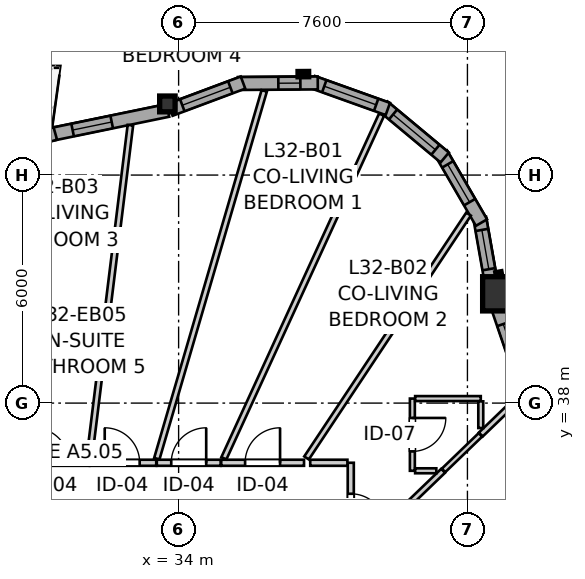
"""IFC4 building model, lengths in metres.
Left out: names, types, materials, properties, quantities, classifications, styles, units other than length and angle.
Written with IfcOpenShell. Run it as: python <this file> out.ifc"""

import sys

from ifc_helpers import new_model, si_unit, direction, frame, frame_2d, origin, origin_2d, place, context, subcontext, project, spatial, rectangle, i_section, extrude, source, transform, mapped, element, fill, save


model = new_model("IFC4")
c1 = context("Model", 3, precision=1e-05, world=origin(), true_north=direction((0.0, 1.0)))
c2 = subcontext(c1, "Body", "Model", "MODEL_VIEW")
j1 = project(units=[si_unit("LENGTHUNIT", "METRE"), si_unit("PLANEANGLEUNIT", "RADIAN")], contexts=[c1])
p1 = place(None, origin())
s1 = spatial("IfcSite", under=j1, at=p1, CompositionType="ELEMENT")
p2 = place(p1, origin())
s2 = spatial("IfcBuilding", under=s1, at=p2, CompositionType="ELEMENT")
p3 = place(p2, frame((0.0, 0.0, 108.8)))
s3 = spatial("IfcBuildingStorey", under=s2, at=p3, CompositionType="ELEMENT", Elevation=108.8)
m1 = source(origin(), c2, "Body", "SweptSolid", [
    extrude(rectangle(XDim=0.9, YDim=0.9, at=origin_2d()), origin(), (0.0, 0.0, 1.0), 2.935),
])
p4 = place(p3, frame((42.45, 40.875, 0.0), z_axis=(0.0, 0.0, 1.0), x_axis=(1.0, 0.0, 0.0)))
e1 = element("IfcColumn", 1, at=p4, inside=s3, PredefinedType="COLUMN", context=c2, shape_type="MappedRepresentation", body=[
    mapped(m1, transform((0.0, 0.0, 0.0), x_axis=(1.0, 0.0, 0.0), y_axis=(0.0, 1.0, 0.0), z_axis=(0.0, 0.0, 1.0), scale=1.0)),
])
m2 = source(origin(), c2, "Body", "SweptSolid", [
    extrude(i_section(OverallWidth=0.406, OverallDepth=0.416, WebThickness=0.027, FlangeThickness=0.044, FilletRadius=0.015, at=origin_2d()), origin(), (0.0, 0.0, 1.0), 2.935),
])
p5 = place(p3, frame((33.704, 45.872, 0.0), z_axis=(0.0, 0.0, 1.0), x_axis=(1.0, 0.0, 0.0)))
e2 = element("IfcColumn", 2, at=p5, inside=s3, PredefinedType="PILASTER", context=c2, shape_type="MappedRepresentation", body=[
    mapped(m2, transform((0.0, 0.0, 0.0), x_axis=(1.0, 0.0, 0.0), y_axis=(0.0, 1.0, 0.0), z_axis=(0.0, 0.0, 1.0), scale=1.0)),
])
p6 = place(p3, frame((43.319, 37.809, 0.0), z_axis=(0.0, 0.0, 1.0), x_axis=(-0.323586371726, 0.946198636669, 0.0)))
e3 = element("IfcWall", 3, at=p6, inside=s3, PredefinedType="SOLIDWALL", context=c2, shape_type="SweptSolid", body=[
    extrude(rectangle(XDim=2.952, YDim=0.34, at=frame_2d((1.476, 0.0))), origin(), (0.0, 0.0, 1.0), 2.465),
])
p7 = place(p6, frame((0.949, 0.0, 0.82)))
e4 = element("IfcOpeningElement", 4, at=p7, cuts=e3, PredefinedType="OPENING", context=c2, shape_type="SweptSolid", body=[
    extrude(rectangle(XDim=1.45, YDim=1.25, at=frame_2d((0.725, 0.625))), frame((0.0, 0.18, 0.0), z_axis=(0.0, -1.0, 0.0), x_axis=(1.0, 0.0, 0.0)), (0.0, 0.0, 1.0), 0.36),
])
p8 = place(p3, frame((42.242, 41.072, 0.0), z_axis=(0.0, 0.0, 1.0), x_axis=(-0.17440141227, 0.984674640375, 0.0)))
e5 = element("IfcWall", 5, at=p8, inside=s3, PredefinedType="SOLIDWALL", context=c2, shape_type="SweptSolid", body=[
    extrude(rectangle(XDim=1.831, YDim=0.34, at=frame_2d((0.916, 0.0))), origin(), (0.0, 0.0, 1.0), 2.465),
])
p9 = place(p8, frame((0.457, 0.0, 0.82)))
e6 = element("IfcOpeningElement", 6, at=p9, cuts=e5, PredefinedType="OPENING", context=c2, shape_type="SweptSolid", body=[
    extrude(rectangle(XDim=1.05, YDim=1.45, at=frame_2d((0.525, 0.725))), frame((0.0, 0.18, 0.0), z_axis=(0.0, -1.0, 0.0), x_axis=(1.0, 0.0, 0.0)), (0.0, 0.0, 1.0), 0.36),
])
p10 = place(p3, frame((41.969, 42.749, 0.0), z_axis=(0.0, 0.0, 1.0), x_axis=(-0.501989603552, 0.864873654313, 0.0)))
e7 = element("IfcWall", 7, at=p10, inside=s3, PredefinedType="SOLIDWALL", context=c2, shape_type="SweptSolid", body=[
    extrude(rectangle(XDim=2.099, YDim=0.34, at=frame_2d((1.05, 0.0))), origin(), (0.0, 0.0, 1.0), 2.465),
])
p11 = place(p10, frame((0.622, 0.0, 0.82)))
e8 = element("IfcOpeningElement", 8, at=p11, cuts=e7, PredefinedType="OPENING", context=c2, shape_type="SweptSolid", body=[
    extrude(rectangle(XDim=1.15, YDim=1.2, at=frame_2d((0.575, 0.6))), frame((0.0, 0.18, 0.0), z_axis=(0.0, -1.0, 0.0), x_axis=(1.0, 0.0, 0.0)), (0.0, 0.0, 1.0), 0.36),
])
p12 = place(p3, frame((41.002, 44.462, 0.0), z_axis=(0.0, 0.0, 1.0), x_axis=(-0.768488123124, 0.639864051669, 0.0)))
e9 = element("IfcWall", 9, at=p12, inside=s3, PredefinedType="SOLIDWALL", context=c2, shape_type="SweptSolid", body=[
    extrude(rectangle(XDim=2.099, YDim=0.34, at=frame_2d((1.05, 0.0))), origin(), (0.0, 0.0, 1.0), 2.465),
])
p13 = place(p12, frame((0.319, 0.0, 0.82)))
e10 = element("IfcOpeningElement", 10, at=p13, cuts=e9, PredefinedType="OPENING", context=c2, shape_type="SweptSolid", body=[
    extrude(rectangle(XDim=1.45, YDim=1.25, at=frame_2d((0.725, 0.625))), frame((0.0, 0.18, 0.0), z_axis=(0.0, -1.0, 0.0), x_axis=(1.0, 0.0, 0.0)), (0.0, 0.0, 1.0), 0.36),
])
p14 = place(p3, frame((39.506, 45.739, 0.0), z_axis=(0.0, 0.0, 1.0), x_axis=(-0.941486401639, 0.33705096874, 0.0)))
e11 = element("IfcWall", 11, at=p14, inside=s3, PredefinedType="SOLIDWALL", context=c2, shape_type="SweptSolid", body=[
    extrude(rectangle(XDim=2.099, YDim=0.34, at=frame_2d((1.05, 0.0))), origin(), (0.0, 0.0, 1.0), 2.465),
])
p15 = place(p14, frame((0.327, 0.0, 0.82)))
e12 = element("IfcOpeningElement", 12, at=p15, cuts=e11, PredefinedType="OPENING", context=c2, shape_type="SweptSolid", body=[
    extrude(rectangle(XDim=1.45, YDim=1.25, at=frame_2d((0.725, 0.625))), frame((0.0, 0.18, 0.0), z_axis=(0.0, -1.0, 0.0), x_axis=(1.0, 0.0, 0.0)), (0.0, 0.0, 1.0), 0.36),
])
p16 = place(p3, frame((37.662, 46.424, 0.0), z_axis=(0.0, 0.0, 1.0), x_axis=(-0.999976456891, -0.00686189939, 0.0)))
e13 = element("IfcWall", 13, at=p16, inside=s3, PredefinedType="SOLIDWALL", context=c2, shape_type="SweptSolid", body=[
    extrude(rectangle(XDim=2.099, YDim=0.34, at=frame_2d((1.05, 0.0))), origin(), (0.0, 0.0, 1.0), 2.465),
])
p17 = place(p16, frame((0.458, 0.0, 0.82)))
e14 = element("IfcOpeningElement", 14, at=p17, cuts=e13, PredefinedType="OPENING", context=c2, shape_type="SweptSolid", body=[
    extrude(rectangle(XDim=0.58, YDim=1.35, at=frame_2d((0.29, 0.675))), frame((0.0, 0.18, 0.0), z_axis=(0.0, -1.0, 0.0), x_axis=(1.0, 0.0, 0.0)), (0.0, 0.0, 1.0), 0.36),
])
p18 = place(p3, frame((35.695, 46.434, 0.0), z_axis=(0.0, 0.0, 1.0), x_axis=(-0.9368002254, -0.349864741994, 0.0)))
e15 = element("IfcWall", 15, at=p18, inside=s3, PredefinedType="SOLIDWALL", context=c2, shape_type="SweptSolid", body=[
    extrude(rectangle(XDim=2.041, YDim=0.34, at=frame_2d((1.021, 0.0))), origin(), (0.0, 0.0, 1.0), 2.465),
])
p19 = place(p18, frame((0.355, 0.0, 0.82)))
e16 = element("IfcOpeningElement", 16, at=p19, cuts=e15, PredefinedType="OPENING", context=c2, shape_type="SweptSolid", body=[
    extrude(rectangle(XDim=1.35, YDim=1.45, at=frame_2d((0.675, 0.725))), frame((0.0, 0.18, 0.0), z_axis=(0.0, -1.0, 0.0), x_axis=(1.0, 0.0, 0.0)), (0.0, 0.0, 1.0), 0.36),
])
p20 = place(p3, frame((33.719, 45.701, 0.0), z_axis=(0.0, 0.0, 1.0), x_axis=(-0.979417849231, -0.201843198072, 0.0)))
e17 = element("IfcWall", 17, at=p20, inside=s3, PredefinedType="SOLIDWALL", context=c2, shape_type="SweptSolid", body=[
    extrude(rectangle(XDim=3.113, YDim=0.34, at=frame_2d((1.557, 0.0))), origin(), (0.0, 0.0, 1.0), 2.465),
])
p21 = place(p20, frame((1.511, 0.0, 0.82)))
e18 = element("IfcOpeningElement", 18, at=p21, cuts=e17, PredefinedType="OPENING", context=c2, shape_type="SweptSolid", body=[
    extrude(rectangle(XDim=1.05, YDim=1.45, at=frame_2d((0.525, 0.725))), frame((0.0, 0.18, 0.0), z_axis=(0.0, -1.0, 0.0), x_axis=(1.0, 0.0, 0.0)), (0.0, 0.0, 1.0), 0.36),
])
p22 = place(p3, frame((30.755, 45.094, 0.0), z_axis=(0.0, 0.0, 1.0), x_axis=(-0.963040794714, -0.269355578589, 0.0)))
e19 = element("IfcWall", 19, at=p22, inside=s3, PredefinedType="SOLIDWALL", context=c2, shape_type="SweptSolid", body=[
    extrude(rectangle(XDim=2.839, YDim=0.34, at=frame_2d((1.419, 0.0))), origin(), (0.0, 0.0, 1.0), 2.465),
])
p23 = place(p22, frame((0.373, 0.0, 0.82)))
e20 = element("IfcOpeningElement", 20, at=p23, cuts=e19, PredefinedType="OPENING", context=c2, shape_type="SweptSolid", body=[
    extrude(rectangle(XDim=1.05, YDim=1.45, at=frame_2d((0.525, 0.725))), frame((0.0, 0.18, 0.0), z_axis=(0.0, -1.0, 0.0), x_axis=(1.0, 0.0, 0.0)), (0.0, 0.0, 1.0), 0.36),
])
p24 = place(p22, frame((1.792, 0.0, 0.82)))
e21 = element("IfcOpeningElement", 21, at=p24, cuts=e19, PredefinedType="OPENING", context=c2, shape_type="SweptSolid", body=[
    extrude(rectangle(XDim=0.58, YDim=1.35, at=frame_2d((0.29, 0.675))), frame((0.0, 0.18, 0.0), z_axis=(0.0, -1.0, 0.0), x_axis=(1.0, 0.0, 0.0)), (0.0, 0.0, 1.0), 0.36),
])
p25 = place(p3, frame((38.53, 36.43, 0.0), z_axis=(0.0, 0.0, 1.0), x_axis=(0.0, -1.0, 0.0)))
e22 = element("IfcWall", 22, at=p25, inside=s3, PredefinedType="PARTITIONING", context=c2, shape_type="SweptSolid", body=[
    extrude(rectangle(XDim=2.516, YDim=0.16, at=frame_2d((1.258, 0.0))), origin(), (0.0, 0.0, 1.0), 2.573),
])
p26 = place(p25, frame((0.816, 0.0, 0.0)))
e23 = element("IfcOpeningElement", 23, at=p26, cuts=e22, PredefinedType="OPENING", context=c2, shape_type="SweptSolid", body=[
    extrude(rectangle(XDim=0.92, YDim=2.1, at=frame_2d((0.46, 1.05))), frame((0.0, 0.09, 0.0), z_axis=(0.0, -1.0, 0.0), x_axis=(1.0, 0.0, 0.0)), (0.0, 0.0, 1.0), 0.18),
])
p27 = place(p3, frame((35.121, 36.43, 0.0), z_axis=(0.0, 0.0, 1.0), x_axis=(1.0, 0.0, 0.0)))
e24 = element("IfcWall", 24, at=p27, inside=s3, PredefinedType="PARTITIONING", context=c2, shape_type="SweptSolid", body=[
    extrude(rectangle(XDim=2.179, YDim=0.16, at=frame_2d((1.089, 0.0))), origin(), (0.0, 0.0, 1.0), 2.573),
])
p28 = place(p27, frame((0.628, 0.0, 0.0)))
e25 = element("IfcOpeningElement", 25, at=p28, cuts=e24, PredefinedType="OPENING", context=c2, shape_type="SweptSolid", body=[
    extrude(rectangle(XDim=0.92, YDim=2.1, at=frame_2d((0.46, 1.05))), frame((0.0, 0.09, 0.0), z_axis=(0.0, -1.0, 0.0), x_axis=(1.0, 0.0, 0.0)), (0.0, 0.0, 1.0), 0.18),
])
p29 = place(p3, frame((29.7, 36.43, 0.0), z_axis=(0.0, 0.0, 1.0), x_axis=(1.0, 0.0, 0.0)))
e26 = element("IfcWall", 26, at=p29, inside=s3, PredefinedType="PARTITIONING", context=c2, shape_type="SweptSolid", body=[
    extrude(rectangle(XDim=1.951, YDim=0.16, at=frame_2d((0.976, 0.0))), origin(), (0.0, 0.0, 1.0), 2.935),
])
p30 = place(p29, frame((0.493, 0.0, 0.0)))
e27 = element("IfcOpeningElement", 27, at=p30, cuts=e26, PredefinedType="OPENING", context=c2, shape_type="SweptSolid", body=[
    extrude(rectangle(XDim=0.92, YDim=2.1, at=frame_2d((0.46, 1.05))), frame((0.0, 0.09, 0.0), z_axis=(0.0, -1.0, 0.0), x_axis=(1.0, 0.0, 0.0)), (0.0, 0.0, 1.0), 0.18),
])
p31 = place(p3, frame((40.151, 38.119, 0.0), z_axis=(0.0, 0.0, 1.0), x_axis=(0.0, -1.0, 0.0)))
e28 = element("IfcWall", 28, at=p31, inside=s3, PredefinedType="PARTITIONING", context=c2, shape_type="SweptSolid", body=[
    extrude(rectangle(XDim=1.9, YDim=0.13, at=frame_2d((0.95, 0.0))), origin(), (0.0, 0.0, 1.0), 2.935),
])
p32 = place(p31, frame((0.51, 0.0, 0.0)))
e29 = element("IfcOpeningElement", 29, at=p32, cuts=e28, PredefinedType="OPENING", context=c2, shape_type="SweptSolid", body=[
    extrude(rectangle(XDim=0.88, YDim=2.05, at=frame_2d((0.44, 1.025))), frame((0.0, 0.075, 0.0), z_axis=(0.0, -1.0, 0.0), x_axis=(1.0, 0.0, 0.0)), (0.0, 0.0, 1.0), 0.15),
])
p33 = place(p3, frame((31.666, 36.43, 0.0), z_axis=(0.0, 0.0, 1.0), x_axis=(1.0, 0.0, 0.0)))
e30 = element("IfcWall", 30, at=p33, inside=s3, PredefinedType="PARTITIONING", context=c2, shape_type="SweptSolid", body=[
    extrude(rectangle(XDim=1.745, YDim=0.16, at=frame_2d((0.873, 0.0))), origin(), (0.0, 0.0, 1.0), 2.935),
])
p34 = place(p33, frame((0.389, 0.0, 0.0)))
e31 = element("IfcOpeningElement", 31, at=p34, cuts=e30, PredefinedType="OPENING", context=c2, shape_type="SweptSolid", body=[
    extrude(rectangle(XDim=0.92, YDim=2.1, at=frame_2d((0.46, 1.05))), frame((0.0, 0.09, 0.0), z_axis=(0.0, -1.0, 0.0), x_axis=(1.0, 0.0, 0.0)), (0.0, 0.0, 1.0), 0.18),
])
p35 = place(p3, frame((33.426, 36.43, 0.0), z_axis=(0.0, 0.0, 1.0), x_axis=(1.0, 0.0, 0.0)))
e32 = element("IfcWall", 32, at=p35, inside=s3, PredefinedType="PARTITIONING", context=c2, shape_type="SweptSolid", body=[
    extrude(rectangle(XDim=1.68, YDim=0.16, at=frame_2d((0.84, 0.0))), origin(), (0.0, 0.0, 1.0), 2.935),
])
p36 = place(p35, frame((0.38, 0.0, 0.0)))
e33 = element("IfcOpeningElement", 33, at=p36, cuts=e32, PredefinedType="OPENING", context=c2, shape_type="SweptSolid", body=[
    extrude(rectangle(XDim=0.92, YDim=2.1, at=frame_2d((0.46, 1.05))), frame((0.0, 0.09, 0.0), z_axis=(0.0, -1.0, 0.0), x_axis=(1.0, 0.0, 0.0)), (0.0, 0.0, 1.0), 0.18),
])
p37 = place(p3, frame((33.427, 36.538, 0.0), z_axis=(0.0, 0.0, 1.0), x_axis=(0.280326379037, 0.959904745908, 0.0)))
e34 = element("IfcWall", 34, at=p37, inside=s3, PredefinedType="PARTITIONING", context=c2, shape_type="SweptSolid", body=[
    extrude(rectangle(XDim=10.082, YDim=0.145, at=frame_2d((5.041, 0.0))), origin(), (0.0, 0.0, 1.0), 2.935),
])
p38 = place(p3, frame((35.191, 36.548, 0.0), z_axis=(0.0, 0.0, 1.0), x_axis=(0.417154036681, 0.908835799075, 0.0)))
e35 = element("IfcWall", 35, at=p38, inside=s3, PredefinedType="PARTITIONING", context=c2, shape_type="SweptSolid", body=[
    extrude(rectangle(XDim=9.949, YDim=0.145, at=frame_2d((4.974, 0.0))), origin(), (0.0, 0.0, 1.0), 2.935),
])
p39 = place(p3, frame((31.648, 36.527, 0.0), z_axis=(0.0, 0.0, 1.0), x_axis=(0.122371290087, 0.992484391496, 0.0)))
e36 = element("IfcWall", 36, at=p39, inside=s3, PredefinedType="PARTITIONING", context=c2, shape_type="SweptSolid", body=[
    extrude(rectangle(XDim=8.852, YDim=0.145, at=frame_2d((4.426, 0.0))), origin(), (0.0, 0.0, 1.0), 2.935),
])
p40 = place(p3, frame((37.366, 36.557, 0.0), z_axis=(0.0, 0.0, 1.0), x_axis=(0.553463679146, 0.832873313215, 0.0)))
e37 = element("IfcWall", 37, at=p40, inside=s3, PredefinedType="PARTITIONING", context=c2, shape_type="SweptSolid", body=[
    extrude(rectangle(XDim=7.704, YDim=0.145, at=frame_2d((3.852, 0.0))), origin(), (0.0, 0.0, 1.0), 2.935),
])
p41 = place(p3, frame((38.666, 34.009, 0.0), z_axis=(0.0, 0.0, 1.0), x_axis=(0.72031454127, 0.693647577402, 0.0)))
e38 = element("IfcWall", 38, at=p41, inside=s3, PredefinedType="PARTITIONING", context=c2, shape_type="SweptSolid", body=[
    extrude(rectangle(XDim=3.186, YDim=0.145, at=frame_2d((1.593, 0.0))), origin(), (0.0, 0.0, 1.0), 2.935),
])
p42 = place(p3, frame((40.224, 38.119, 0.0), z_axis=(0.0, 0.0, 1.0), x_axis=(1.0, 0.0, 0.0)))
e39 = element("IfcWall", 39, at=p42, inside=s3, PredefinedType="PARTITIONING", context=c2, shape_type="SweptSolid", body=[
    extrude(rectangle(XDim=1.727, YDim=0.13, at=frame_2d((0.863, 0.0))), origin(), (0.0, 0.0, 1.0), 2.935),
])
p43 = place(p3, frame((41.951, 37.173, 0.0), z_axis=(0.0, 0.0, 1.0), x_axis=(0.720559112487, 0.693393514111, 0.0)))
e40 = element("IfcWall", 40, at=p43, inside=s3, PredefinedType="PARTITIONING", context=c2, shape_type="SweptSolid", body=[
    extrude(rectangle(XDim=1.456, YDim=0.145, at=frame_2d((0.728, 0.0))), origin(), (0.0, 0.0, 1.0), 2.935),
])
p44 = place(p3, frame((40.972, 36.229, 0.0), z_axis=(0.0, 0.0, 1.0), x_axis=(0.72014550452, 0.693823069896, 0.0)))
e41 = element("IfcWall", 41, at=p44, inside=s3, PredefinedType="PARTITIONING", context=c2, shape_type="SweptSolid", body=[
    extrude(rectangle(XDim=1.345, YDim=0.13, at=frame_2d((0.672, 0.0))), origin(), (0.0, 0.0, 1.0), 2.935),
])
p45 = place(p3, frame((37.463, 36.43, 0.0), z_axis=(0.0, 0.0, 1.0), x_axis=(1.0, 0.0, 0.0)))
e42 = element("IfcWall", 42, at=p45, inside=s3, PredefinedType="PARTITIONING", context=c2, shape_type="SweptSolid", body=[
    extrude(rectangle(XDim=0.979, YDim=0.16, at=frame_2d((0.489, 0.0))), origin(), (0.0, 0.0, 1.0), 2.573),
])
p46 = place(p3, frame((41.951, 37.344, 0.0), z_axis=(0.0, 0.0, 1.0), x_axis=(0.0, 1.0, 0.0)))
e43 = element("IfcWall", 43, at=p46, inside=s3, PredefinedType="PARTITIONING", context=c2, shape_type="SweptSolid", body=[
    extrude(rectangle(XDim=0.702, YDim=0.13, at=frame_2d((0.351, 0.0))), origin(), (0.0, 0.0, 1.0), 2.935),
])
p47 = place(p3, frame((40.224, 36.219, 0.0), z_axis=(0.0, 0.0, 1.0), x_axis=(1.0, 0.0, 0.0)))
e44 = element("IfcWall", 44, at=p47, inside=s3, PredefinedType="PARTITIONING", context=c2, shape_type="SweptSolid", body=[
    extrude(rectangle(XDim=0.557, YDim=0.13, at=frame_2d((0.278, 0.0))), origin(), (0.0, 0.0, 1.0), 2.935),
])
m3 = source(origin(), c2, "Body", "SweptSolid", [
    extrude(rectangle(XDim=1.45, YDim=1.25, at=frame_2d((0.725, 0.625))), frame((0.0, 0.03, 0.0), z_axis=(0.0, -1.0, 0.0), x_axis=(1.0, 0.0, 0.0)), (0.0, 0.0, 1.0), 0.06),
])
p48 = place(p7, origin())
e45 = element("IfcWindow", 45, at=p48, inside=s3, PartitioningType="SINGLE_PANEL", PredefinedType="WINDOW", context=c2, shape_type="MappedRepresentation", body=[
    mapped(m3, transform((0.0, 0.0, 0.0), x_axis=(1.0, 0.0, 0.0), y_axis=(0.0, 1.0, 0.0), z_axis=(0.0, 0.0, 1.0), scale=1.0)),
])
fill(e4, e45)
m4 = source(origin(), c2, "Body", "SweptSolid", [
    extrude(rectangle(XDim=1.05, YDim=1.45, at=frame_2d((0.525, 0.725))), frame((0.0, 0.03, 0.0), z_axis=(0.0, -1.0, 0.0), x_axis=(1.0, 0.0, 0.0)), (0.0, 0.0, 1.0), 0.06),
])
p49 = place(p9, origin())
e46 = element("IfcWindow", 46, at=p49, inside=s3, PartitioningType="SINGLE_PANEL", PredefinedType="WINDOW", context=c2, shape_type="MappedRepresentation", body=[
    mapped(m4, transform((0.0, 0.0, 0.0), x_axis=(1.0, 0.0, 0.0), y_axis=(0.0, 1.0, 0.0), z_axis=(0.0, 0.0, 1.0), scale=1.0)),
])
fill(e6, e46)
m5 = source(origin(), c2, "Body", "SweptSolid", [
    extrude(rectangle(XDim=1.15, YDim=1.2, at=frame_2d((0.575, 0.6))), frame((0.0, 0.03, 0.0), z_axis=(0.0, -1.0, 0.0), x_axis=(1.0, 0.0, 0.0)), (0.0, 0.0, 1.0), 0.06),
])
p50 = place(p11, origin())
e47 = element("IfcWindow", 47, at=p50, inside=s3, PartitioningType="SINGLE_PANEL", PredefinedType="WINDOW", context=c2, shape_type="MappedRepresentation", body=[
    mapped(m5, transform((0.0, 0.0, 0.0), x_axis=(1.0, 0.0, 0.0), y_axis=(0.0, 1.0, 0.0), z_axis=(0.0, 0.0, 1.0), scale=1.0)),
])
fill(e8, e47)
p51 = place(p13, origin())
e48 = element("IfcWindow", 48, at=p51, inside=s3, PartitioningType="SINGLE_PANEL", PredefinedType="WINDOW", context=c2, shape_type="MappedRepresentation", body=[
    mapped(m3, transform((0.0, 0.0, 0.0), x_axis=(1.0, 0.0, 0.0), y_axis=(0.0, 1.0, 0.0), z_axis=(0.0, 0.0, 1.0), scale=1.0)),
])
fill(e10, e48)
p52 = place(p15, origin())
e49 = element("IfcWindow", 49, at=p52, inside=s3, PartitioningType="SINGLE_PANEL", PredefinedType="WINDOW", context=c2, shape_type="MappedRepresentation", body=[
    mapped(m3, transform((0.0, 0.0, 0.0), x_axis=(1.0, 0.0, 0.0), y_axis=(0.0, 1.0, 0.0), z_axis=(0.0, 0.0, 1.0), scale=1.0)),
])
fill(e12, e49)
m6 = source(origin(), c2, "Body", "SweptSolid", [
    extrude(rectangle(XDim=0.58, YDim=1.35, at=frame_2d((0.29, 0.675))), frame((0.0, 0.03, 0.0), z_axis=(0.0, -1.0, 0.0), x_axis=(1.0, 0.0, 0.0)), (0.0, 0.0, 1.0), 0.06),
])
p53 = place(p17, origin())
e50 = element("IfcWindow", 50, at=p53, inside=s3, PartitioningType="SINGLE_PANEL", PredefinedType="WINDOW", context=c2, shape_type="MappedRepresentation", body=[
    mapped(m6, transform((0.0, 0.0, 0.0), x_axis=(1.0, 0.0, 0.0), y_axis=(0.0, 1.0, 0.0), z_axis=(0.0, 0.0, 1.0), scale=1.0)),
])
fill(e14, e50)
m7 = source(origin(), c2, "Body", "SweptSolid", [
    extrude(rectangle(XDim=1.35, YDim=1.45, at=frame_2d((0.675, 0.725))), frame((0.0, 0.03, 0.0), z_axis=(0.0, -1.0, 0.0), x_axis=(1.0, 0.0, 0.0)), (0.0, 0.0, 1.0), 0.06),
])
p54 = place(p19, origin())
e51 = element("IfcWindow", 51, at=p54, inside=s3, PartitioningType="SINGLE_PANEL", PredefinedType="WINDOW", context=c2, shape_type="MappedRepresentation", body=[
    mapped(m7, transform((0.0, 0.0, 0.0), x_axis=(1.0, 0.0, 0.0), y_axis=(0.0, 1.0, 0.0), z_axis=(0.0, 0.0, 1.0), scale=1.0)),
])
fill(e16, e51)
p55 = place(p21, origin())
e52 = element("IfcWindow", 52, at=p55, inside=s3, PartitioningType="SINGLE_PANEL", PredefinedType="WINDOW", context=c2, shape_type="MappedRepresentation", body=[
    mapped(m4, transform((0.0, 0.0, 0.0), x_axis=(1.0, 0.0, 0.0), y_axis=(0.0, 1.0, 0.0), z_axis=(0.0, 0.0, 1.0), scale=1.0)),
])
fill(e18, e52)
m8 = source(origin(), c2, "Body", "SweptSolid", [
    extrude(rectangle(XDim=0.92, YDim=2.1, at=frame_2d((0.46, 1.05))), frame((0.0, 0.025, 0.0), z_axis=(0.0, -1.0, 0.0), x_axis=(1.0, 0.0, 0.0)), (0.0, 0.0, 1.0), 0.05),
])
p56 = place(p26, origin())
e53 = element("IfcDoor", 53, at=p56, inside=s3, OperationType="SINGLE_SWING_RIGHT", PredefinedType="DOOR", context=c2, shape_type="MappedRepresentation", body=[
    mapped(m8, transform((0.0, 0.0, 0.0), x_axis=(1.0, 0.0, 0.0), y_axis=(0.0, 1.0, 0.0), z_axis=(0.0, 0.0, 1.0), scale=1.0)),
])
fill(e23, e53)
p57 = place(p28, origin())
e54 = element("IfcDoor", 54, at=p57, inside=s3, OperationType="SINGLE_SWING_RIGHT", PredefinedType="DOOR", context=c2, shape_type="MappedRepresentation", body=[
    mapped(m8, transform((0.0, 0.0, 0.0), x_axis=(1.0, 0.0, 0.0), y_axis=(0.0, 1.0, 0.0), z_axis=(0.0, 0.0, 1.0), scale=1.0)),
])
fill(e25, e54)
p58 = place(p30, origin())
e55 = element("IfcDoor", 55, at=p58, inside=s3, OperationType="SINGLE_SWING_LEFT", PredefinedType="DOOR", context=c2, shape_type="MappedRepresentation", body=[
    mapped(m8, transform((0.0, 0.0, 0.0), x_axis=(1.0, 0.0, 0.0), y_axis=(0.0, 1.0, 0.0), z_axis=(0.0, 0.0, 1.0), scale=1.0)),
])
fill(e27, e55)
m9 = source(origin(), c2, "Body", "SweptSolid", [
    extrude(rectangle(XDim=0.88, YDim=2.05, at=frame_2d((0.44, 1.025))), frame((0.0, 0.025, 0.0), z_axis=(0.0, -1.0, 0.0), x_axis=(1.0, 0.0, 0.0)), (0.0, 0.0, 1.0), 0.05),
])
p59 = place(p32, origin())
e56 = element("IfcDoor", 56, at=p59, inside=s3, OperationType="SINGLE_SWING_LEFT", PredefinedType="DOOR", context=c2, shape_type="MappedRepresentation", body=[
    mapped(m9, transform((0.0, 0.0, 0.0), x_axis=(1.0, 0.0, 0.0), y_axis=(0.0, 1.0, 0.0), z_axis=(0.0, 0.0, 1.0), scale=1.0)),
])
fill(e29, e56)
p60 = place(p34, origin())
e57 = element("IfcDoor", 57, at=p60, inside=s3, OperationType="SINGLE_SWING_LEFT", PredefinedType="DOOR", context=c2, shape_type="MappedRepresentation", body=[
    mapped(m8, transform((0.0, 0.0, 0.0), x_axis=(1.0, 0.0, 0.0), y_axis=(0.0, 1.0, 0.0), z_axis=(0.0, 0.0, 1.0), scale=1.0)),
])
fill(e31, e57)
p61 = place(p36, origin())
e58 = element("IfcDoor", 58, at=p61, inside=s3, OperationType="SINGLE_SWING_RIGHT", PredefinedType="DOOR", context=c2, shape_type="MappedRepresentation", body=[
    mapped(m8, transform((0.0, 0.0, 0.0), x_axis=(1.0, 0.0, 0.0), y_axis=(0.0, 1.0, 0.0), z_axis=(0.0, 0.0, 1.0), scale=1.0)),
])
fill(e33, e58)
save(model, sys.argv[1])
